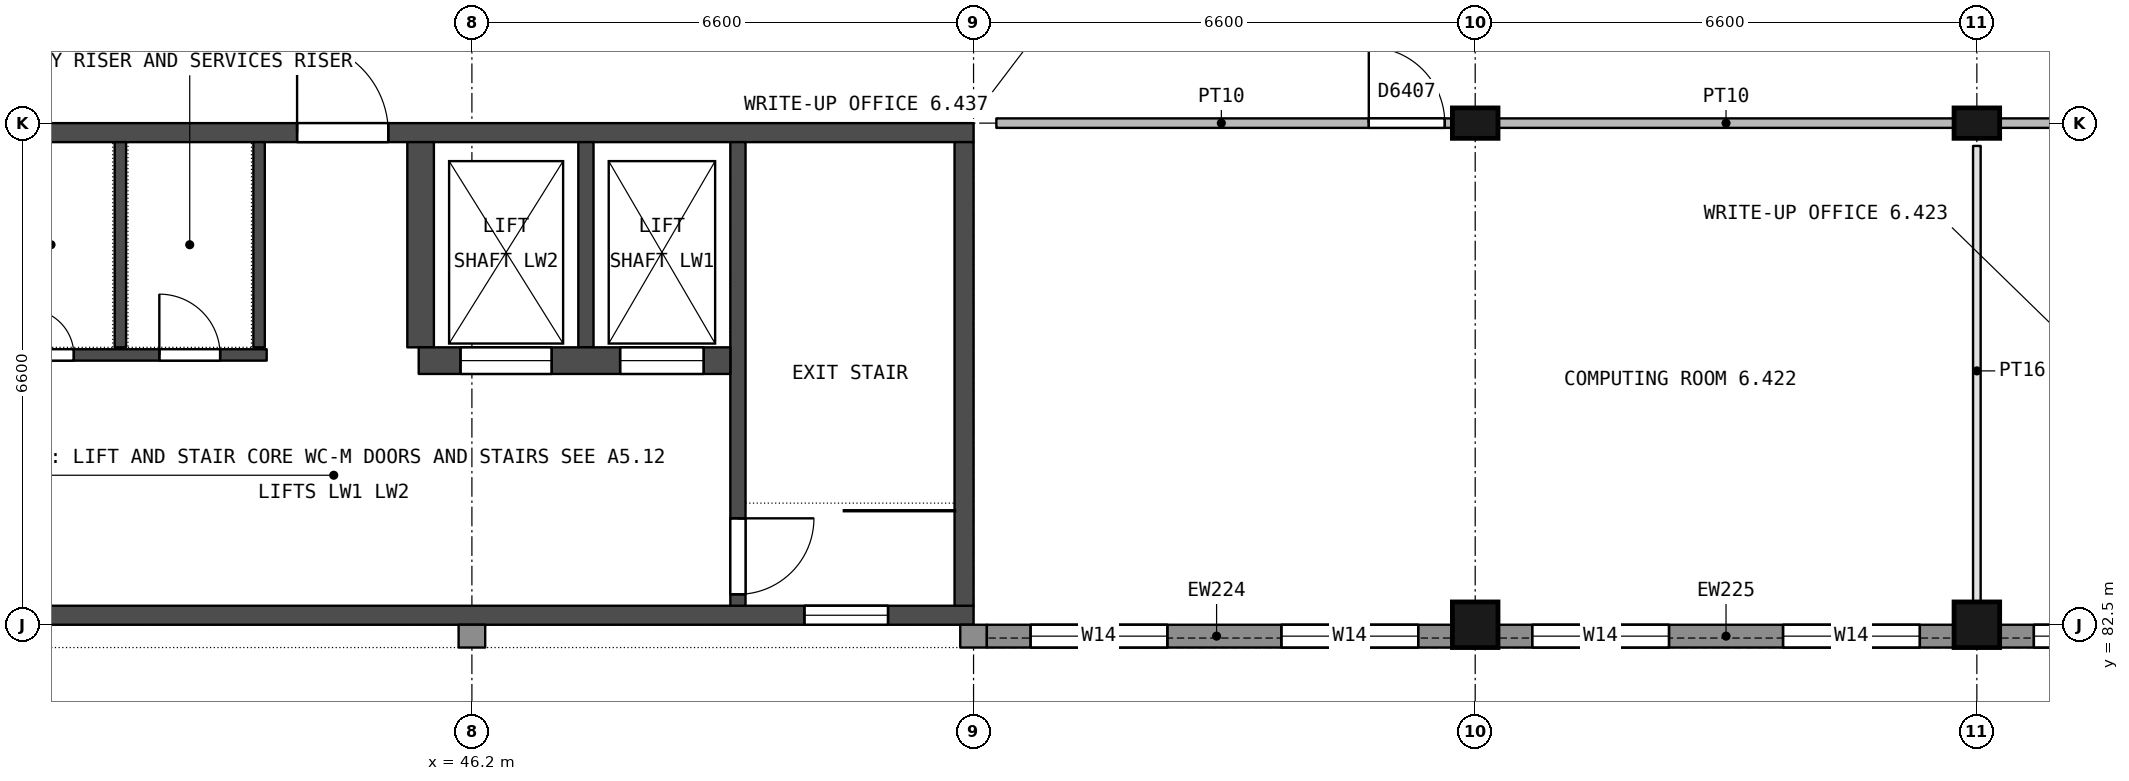
"""IFC4 building model, lengths in metres.
Left out: names, types, materials, properties, quantities, classifications, styles, units other than length and angle.
Written with IfcOpenShell. Run it as: python <this file> out.ifc"""

import sys

from ifc_helpers import new_model, si_unit, direction, frame, frame_2d, origin, origin_2d, place, context, subcontext, project, spatial, rectangle, extrude, element, fill, save


model = new_model("IFC4")
c1 = context("Model", 3, precision=1e-05, world=origin(), true_north=direction((0.0, 1.0)))
c2 = subcontext(c1, "Body", "Model", "MODEL_VIEW")
j1 = project(units=[si_unit("LENGTHUNIT", "METRE"), si_unit("PLANEANGLEUNIT", "RADIAN")], contexts=[c1])
p1 = place(None, origin())
s1 = spatial("IfcSite", under=j1, at=p1, CompositionType="ELEMENT")
p2 = place(p1, origin())
s2 = spatial("IfcBuilding", under=s1, at=p2, CompositionType="ELEMENT")
p3 = place(p2, frame((0.0, 0.0, 18.9)))
s3 = spatial("IfcBuildingStorey", under=s2, at=p3, CompositionType="ELEMENT", Elevation=18.9)
p4 = place(p3, frame((59.4, 82.5, 0.0), z_axis=(0.0, 0.0, 1.0), x_axis=(1.0, 0.0, 0.0)))
e1 = element("IfcColumn", 1, at=p4, inside=s3, PredefinedType="COLUMN", context=c2, shape_type="SweptSolid", body=[
    extrude(rectangle(XDim=0.6, YDim=0.6, at=origin_2d()), origin(), (0.0, 0.0, 1.0), 4.25),
])
p5 = place(p3, frame((59.4, 89.1, 0.0), z_axis=(0.0, 0.0, 1.0), x_axis=(1.0, 0.0, 0.0)))
e2 = element("IfcColumn", 2, at=p5, inside=s3, PredefinedType="COLUMN", context=c2, shape_type="SweptSolid", body=[
    extrude(rectangle(XDim=0.6, YDim=0.4, at=origin_2d()), origin(), (0.0, 0.0, 1.0), 4.25),
])
p6 = place(p3, frame((66.0, 82.5, 0.0), z_axis=(0.0, 0.0, 1.0), x_axis=(1.0, 0.0, 0.0)))
e3 = element("IfcColumn", 3, at=p6, inside=s3, PredefinedType="COLUMN", context=c2, shape_type="SweptSolid", body=[
    extrude(rectangle(XDim=0.6, YDim=0.6, at=origin_2d()), origin(), (0.0, 0.0, 1.0), 4.25),
])
p7 = place(p3, frame((66.0, 89.1, 0.0), z_axis=(0.0, 0.0, 1.0), x_axis=(1.0, 0.0, 0.0)))
e4 = element("IfcColumn", 4, at=p7, inside=s3, PredefinedType="COLUMN", context=c2, shape_type="SweptSolid", body=[
    extrude(rectangle(XDim=0.6, YDim=0.4, at=origin_2d()), origin(), (0.0, 0.0, 1.0), 4.25),
])
p8 = place(p3, frame((52.8, 88.975, 0.0), z_axis=(0.0, 0.0, 1.0), x_axis=(-1.0, 0.0, 0.0)))
e5 = element("IfcWall", 5, at=p8, inside=s3, PredefinedType="SHEAR", context=c2, shape_type="SweptSolid", body=[
    extrude(rectangle(XDim=13.2, YDim=0.25, at=frame_2d((6.6, 0.0))), origin(), (0.0, 0.0, 1.0), 4.25),
])
p9 = place(p8, frame((7.7, 0.0, 0.0)))
e6 = element("IfcOpeningElement", 6, at=p9, cuts=e5, PredefinedType="OPENING", context=c2, shape_type="SweptSolid", body=[
    extrude(rectangle(XDim=1.2, YDim=2.1, at=frame_2d((0.6, 1.05))), frame((0.0, 0.135, 0.0), z_axis=(0.0, -1.0, 0.0), x_axis=(1.0, 0.0, 0.0)), (0.0, 0.0, 1.0), 0.27),
])
p10 = place(p3, frame((52.8, 82.625, 0.0), z_axis=(0.0, 0.0, 1.0), x_axis=(-1.0, 0.0, 0.0)))
e7 = element("IfcWall", 7, at=p10, inside=s3, PredefinedType="SHEAR", context=c2, shape_type="SweptSolid", body=[
    extrude(rectangle(XDim=13.2, YDim=0.25, at=frame_2d((6.6, 0.0))), origin(), (0.0, 0.0, 1.0), 4.25),
])
p11 = place(p10, frame((1.125, 0.0, 0.7)))
e8 = element("IfcOpeningElement", 8, at=p11, cuts=e7, PredefinedType="OPENING", context=c2, shape_type="SweptSolid", body=[
    extrude(rectangle(XDim=1.1, YDim=1.5, at=frame_2d((0.55, 0.75))), frame((0.0, 0.135, 0.0), z_axis=(0.0, -1.0, 0.0), x_axis=(1.0, 0.0, 0.0)), (0.0, 0.0, 1.0), 0.27),
])
p12 = place(p3, frame((52.675, 88.85, 0.0), z_axis=(0.0, 0.0, 1.0), x_axis=(0.0, -1.0, 0.0)))
e9 = element("IfcWall", 9, at=p12, inside=s3, PredefinedType="SHEAR", context=c2, shape_type="SweptSolid", body=[
    extrude(rectangle(XDim=6.1, YDim=0.25, at=frame_2d((3.05, 0.0))), origin(), (0.0, 0.0, 1.0), 4.25),
])
p13 = place(p3, frame((49.7, 88.85, 0.0), z_axis=(0.0, 0.0, 1.0), x_axis=(0.0, -1.0, 0.0)))
e10 = element("IfcWall", 10, at=p13, inside=s3, PredefinedType="SHEAR", context=c2, shape_type="SweptSolid", body=[
    extrude(rectangle(XDim=6.1, YDim=0.2, at=frame_2d((3.05, 0.0))), origin(), (0.0, 0.0, 1.0), 4.25),
])
p14 = place(p13, frame((4.95, 0.0, 0.0)))
e11 = element("IfcOpeningElement", 11, at=p14, cuts=e10, PredefinedType="OPENING", context=c2, shape_type="SweptSolid", body=[
    extrude(rectangle(XDim=1.0, YDim=2.2, at=frame_2d((0.5, 1.1))), frame((0.0, 0.11, 0.0), z_axis=(0.0, -1.0, 0.0), x_axis=(1.0, 0.0, 0.0)), (0.0, 0.0, 1.0), 0.22),
])
p15 = place(p3, frame((47.7, 88.85, 0.0), z_axis=(0.0, 0.0, 1.0), x_axis=(0.0, -1.0, 0.0)))
e12 = element("IfcWall", 12, at=p15, inside=s3, PredefinedType="SHEAR", context=c2, shape_type="SweptSolid", body=[
    extrude(rectangle(XDim=2.7, YDim=0.2, at=frame_2d((1.35, 0.0))), origin(), (0.0, 0.0, 1.0), 4.25),
])
p16 = place(p3, frame((45.525, 88.85, 0.0), z_axis=(0.0, 0.0, 1.0), x_axis=(0.0, -1.0, 0.0)))
e13 = element("IfcWall", 13, at=p16, inside=s3, PredefinedType="SHEAR", context=c2, shape_type="SweptSolid", body=[
    extrude(rectangle(XDim=2.7, YDim=0.35, at=frame_2d((1.35, 0.0))), origin(), (0.0, 0.0, 1.0), 4.25),
])
p17 = place(p3, frame((49.6, 85.975, 0.0), z_axis=(0.0, 0.0, 1.0), x_axis=(-1.0, 0.0, 0.0)))
e14 = element("IfcWall", 14, at=p17, inside=s3, PredefinedType="SHEAR", context=c2, shape_type="SweptSolid", body=[
    extrude(rectangle(XDim=4.1, YDim=0.35, at=frame_2d((2.05, 0.0))), origin(), (0.0, 0.0, 1.0), 4.25),
])
p18 = place(p17, frame((0.35, 0.0, 0.0)))
e15 = element("IfcOpeningElement", 15, at=p18, cuts=e14, PredefinedType="OPENING", context=c2, shape_type="SweptSolid", body=[
    extrude(rectangle(XDim=1.1, YDim=2.2, at=frame_2d((0.55, 1.1))), frame((0.0, 0.185, 0.0), z_axis=(0.0, -1.0, 0.0), x_axis=(1.0, 0.0, 0.0)), (0.0, 0.0, 1.0), 0.37),
])
p19 = place(p17, frame((2.35, 0.0, 0.0)))
e16 = element("IfcOpeningElement", 16, at=p19, cuts=e14, PredefinedType="OPENING", context=c2, shape_type="SweptSolid", body=[
    extrude(rectangle(XDim=1.2, YDim=2.3, at=frame_2d((0.6, 1.15))), frame((0.0, 0.185, 0.0), z_axis=(0.0, -1.0, 0.0), x_axis=(1.0, 0.0, 0.0)), (0.0, 0.0, 1.0), 0.37),
])
p20 = place(p3, frame((43.4, 88.85, 0.0), z_axis=(0.0, 0.0, 1.0), x_axis=(0.0, -1.0, 0.0)))
e17 = element("IfcWall", 17, at=p20, inside=s3, PredefinedType="SHEAR", context=c2, shape_type="SweptSolid", body=[
    extrude(rectangle(XDim=2.7, YDim=0.15, at=frame_2d((1.35, 0.0))), origin(), (0.0, 0.0, 1.0), 4.25),
])
p21 = place(p3, frame((43.5, 86.05, 0.0), z_axis=(0.0, 0.0, 1.0), x_axis=(-1.0, 0.0, 0.0)))
e18 = element("IfcWall", 18, at=p21, inside=s3, PredefinedType="SHEAR", context=c2, shape_type="SweptSolid", body=[
    extrude(rectangle(XDim=3.65, YDim=0.15, at=frame_2d((1.825, 0.0))), origin(), (0.0, 0.0, 1.0), 4.25),
])
p22 = place(p21, frame((0.613, 0.0, 0.0)))
e19 = element("IfcOpeningElement", 19, at=p22, cuts=e18, PredefinedType="OPENING", context=c2, shape_type="SweptSolid", body=[
    extrude(rectangle(XDim=0.8, YDim=2.0, at=frame_2d((0.4, 1.0))), frame((0.0, 0.085, 0.0), z_axis=(0.0, -1.0, 0.0), x_axis=(1.0, 0.0, 0.0)), (0.0, 0.0, 1.0), 0.17),
])
p23 = place(p21, frame((2.538, 0.0, 0.0)))
e20 = element("IfcOpeningElement", 20, at=p23, cuts=e18, PredefinedType="OPENING", context=c2, shape_type="SweptSolid", body=[
    extrude(rectangle(XDim=0.6, YDim=2.1, at=frame_2d((0.3, 1.05))), frame((0.0, 0.085, 0.0), z_axis=(0.0, -1.0, 0.0), x_axis=(1.0, 0.0, 0.0)), (0.0, 0.0, 1.0), 0.17),
])
p24 = place(p3, frame((41.575, 88.85, 0.0), z_axis=(0.0, 0.0, 1.0), x_axis=(0.0, -1.0, 0.0)))
e21 = element("IfcWall", 21, at=p24, inside=s3, PredefinedType="SHEAR", context=c2, shape_type="SweptSolid", body=[
    extrude(rectangle(XDim=2.7, YDim=0.15, at=frame_2d((1.35, 0.0))), origin(), (0.0, 0.0, 1.0), 4.25),
])
for number, where, z_axis, x_axis in (
    (22, (46.375, 82.35, 0.0), (0.0, 0.0, 1.0), (-1.0, 0.0, 0.0)),
    (23, (52.975, 82.35, 0.0), (0.0, 0.0, 1.0), (-1.0, 0.0, 0.0)),
):
    element("IfcWall", number, at=place(p3, frame(where, z_axis=z_axis, x_axis=x_axis)), inside=s3, PredefinedType="STANDARD", context=c2, shape_type="SweptSolid", body=[
        extrude(rectangle(XDim=0.35, YDim=0.3, at=frame_2d((0.175, 0.0))), origin(), (0.0, 0.0, 1.0), 3.65),
    ])
p25 = place(p3, frame((59.1, 82.35, 0.0), z_axis=(0.0, 0.0, 1.0), x_axis=(-1.0, 0.0, 0.0)))
e24 = element("IfcWall", 24, at=p25, inside=s3, PredefinedType="STANDARD", context=c2, shape_type="SweptSolid", body=[
    extrude(rectangle(XDim=6.125, YDim=0.3, at=frame_2d((3.062, 0.0))), origin(), (0.0, 0.0, 1.0), 3.65),
])
p26 = place(p25, frame((3.75, 0.0, 0.9)))
e25 = element("IfcOpeningElement", 25, at=p26, cuts=e24, PredefinedType="OPENING", context=c2, shape_type="SweptSolid", body=[
    extrude(rectangle(XDim=1.8, YDim=1.5, at=frame_2d((0.9, 0.75))), frame((0.0, 0.16, 0.0), z_axis=(0.0, -1.0, 0.0), x_axis=(1.0, 0.0, 0.0)), (0.0, 0.0, 1.0), 0.32),
])
p27 = place(p25, frame((0.45, 0.0, 0.9)))
e26 = element("IfcOpeningElement", 26, at=p27, cuts=e24, PredefinedType="OPENING", context=c2, shape_type="SweptSolid", body=[
    extrude(rectangle(XDim=1.8, YDim=1.5, at=frame_2d((0.9, 0.75))), frame((0.0, 0.16, 0.0), z_axis=(0.0, -1.0, 0.0), x_axis=(1.0, 0.0, 0.0)), (0.0, 0.0, 1.0), 0.32),
])
p28 = place(p3, frame((65.7, 82.35, 0.0), z_axis=(0.0, 0.0, 1.0), x_axis=(-1.0, 0.0, 0.0)))
e27 = element("IfcWall", 27, at=p28, inside=s3, PredefinedType="STANDARD", context=c2, shape_type="SweptSolid", body=[
    extrude(rectangle(XDim=6.0, YDim=0.3, at=frame_2d((3.0, 0.0))), origin(), (0.0, 0.0, 1.0), 3.65),
])
p29 = place(p28, frame((3.75, 0.0, 0.9)))
e28 = element("IfcOpeningElement", 28, at=p29, cuts=e27, PredefinedType="OPENING", context=c2, shape_type="SweptSolid", body=[
    extrude(rectangle(XDim=1.8, YDim=1.5, at=frame_2d((0.9, 0.75))), frame((0.0, 0.16, 0.0), z_axis=(0.0, -1.0, 0.0), x_axis=(1.0, 0.0, 0.0)), (0.0, 0.0, 1.0), 0.32),
])
p30 = place(p28, frame((0.45, 0.0, 0.9)))
e29 = element("IfcOpeningElement", 29, at=p30, cuts=e27, PredefinedType="OPENING", context=c2, shape_type="SweptSolid", body=[
    extrude(rectangle(XDim=1.8, YDim=1.5, at=frame_2d((0.9, 0.75))), frame((0.0, 0.16, 0.0), z_axis=(0.0, -1.0, 0.0), x_axis=(1.0, 0.0, 0.0)), (0.0, 0.0, 1.0), 0.32),
])
p31 = place(p3, frame((72.3, 82.35, 0.0), z_axis=(0.0, 0.0, 1.0), x_axis=(-1.0, 0.0, 0.0)))
e30 = element("IfcWall", 30, at=p31, inside=s3, PredefinedType="STANDARD", context=c2, shape_type="SweptSolid", body=[
    extrude(rectangle(XDim=6.0, YDim=0.3, at=frame_2d((3.0, 0.0))), origin(), (0.0, 0.0, 1.0), 3.65),
])
p32 = place(p31, frame((3.75, 0.0, 0.9)))
e31 = element("IfcOpeningElement", 31, at=p32, cuts=e30, PredefinedType="OPENING", context=c2, shape_type="SweptSolid", body=[
    extrude(rectangle(XDim=1.8, YDim=1.5, at=frame_2d((0.9, 0.75))), frame((0.0, 0.16, 0.0), z_axis=(0.0, -1.0, 0.0), x_axis=(1.0, 0.0, 0.0)), (0.0, 0.0, 1.0), 0.32),
])
p33 = place(p31, frame((0.45, 0.0, 0.9)))
e32 = element("IfcOpeningElement", 32, at=p33, cuts=e30, PredefinedType="OPENING", context=c2, shape_type="SweptSolid", body=[
    extrude(rectangle(XDim=1.8, YDim=1.5, at=frame_2d((0.9, 0.75))), frame((0.0, 0.16, 0.0), z_axis=(0.0, -1.0, 0.0), x_axis=(1.0, 0.0, 0.0)), (0.0, 0.0, 1.0), 0.32),
])
p34 = place(p3, frame((59.1, 89.1, 0.0), z_axis=(0.0, 0.0, 1.0), x_axis=(-1.0, 0.0, 0.0)))
e33 = element("IfcWall", 33, at=p34, inside=s3, PredefinedType="PARTITIONING", context=c2, shape_type="SweptSolid", body=[
    extrude(rectangle(XDim=6.0, YDim=0.125, at=frame_2d((3.0, 0.0))), origin(), (0.0, 0.0, 1.0), 3.65),
])
p35 = place(p34, frame((0.1, 0.0, 0.0)))
e34 = element("IfcOpeningElement", 34, at=p35, cuts=e33, PredefinedType="OPENING", context=c2, shape_type="SweptSolid", body=[
    extrude(rectangle(XDim=1.0, YDim=2.1, at=frame_2d((0.5, 1.05))), frame((0.0, 0.073, 0.0), z_axis=(0.0, -1.0, 0.0), x_axis=(1.0, 0.0, 0.0)), (0.0, 0.0, 1.0), 0.145),
])
p36 = place(p3, frame((59.7, 89.1, 0.0), z_axis=(0.0, 0.0, 1.0), x_axis=(1.0, 0.0, 0.0)))
e35 = element("IfcWall", 35, at=p36, inside=s3, PredefinedType="PARTITIONING", context=c2, shape_type="SweptSolid", body=[
    extrude(rectangle(XDim=6.0, YDim=0.125, at=frame_2d((3.0, 0.0))), origin(), (0.0, 0.0, 1.0), 3.65),
])
p37 = place(p3, frame((72.3, 89.1, 0.0), z_axis=(0.0, 0.0, 1.0), x_axis=(-1.0, 0.0, 0.0)))
e36 = element("IfcWall", 36, at=p37, inside=s3, PredefinedType="PARTITIONING", context=c2, shape_type="SweptSolid", body=[
    extrude(rectangle(XDim=6.0, YDim=0.125, at=frame_2d((3.0, 0.0))), origin(), (0.0, 0.0, 1.0), 3.65),
])
p38 = place(p37, frame((4.2, 0.0, 0.0)))
e37 = element("IfcOpeningElement", 37, at=p38, cuts=e36, PredefinedType="OPENING", context=c2, shape_type="SweptSolid", body=[
    extrude(rectangle(XDim=0.9, YDim=2.1, at=frame_2d((0.45, 1.05))), frame((0.0, 0.073, 0.0), z_axis=(0.0, -1.0, 0.0), x_axis=(1.0, 0.0, 0.0)), (0.0, 0.0, 1.0), 0.145),
])
p39 = place(p37, frame((0.9, 0.0, 0.0)))
e38 = element("IfcOpeningElement", 38, at=p39, cuts=e36, PredefinedType="OPENING", context=c2, shape_type="SweptSolid", body=[
    extrude(rectangle(XDim=0.9, YDim=2.1, at=frame_2d((0.45, 1.05))), frame((0.0, 0.073, 0.0), z_axis=(0.0, -1.0, 0.0), x_axis=(1.0, 0.0, 0.0)), (0.0, 0.0, 1.0), 0.145),
])
p40 = place(p3, frame((66.0, 82.8, 0.0), z_axis=(0.0, 0.0, 1.0), x_axis=(0.0, 1.0, 0.0)))
e39 = element("IfcWall", 39, at=p40, inside=s3, PredefinedType="PARTITIONING", context=c2, shape_type="SweptSolid", body=[
    extrude(rectangle(XDim=6.0, YDim=0.1, at=frame_2d((3.0, 0.0))), origin(), (0.0, 0.0, 1.0), 3.65),
])
p41 = place(p9, origin())
e40 = element("IfcDoor", 40, at=p41, inside=s3, OperationType="SINGLE_SWING_RIGHT", PredefinedType="DOOR", context=c2, shape_type="SweptSolid", body=[
    extrude(rectangle(XDim=1.2, YDim=2.1, at=frame_2d((0.6, 1.05))), frame((0.0, 0.025, 0.0), z_axis=(0.0, -1.0, 0.0), x_axis=(1.0, 0.0, 0.0)), (0.0, 0.0, 1.0), 0.05),
])
fill(e6, e40)
p42 = place(p22, origin())
e41 = element("IfcDoor", 41, at=p42, inside=s3, OperationType="SINGLE_SWING_RIGHT", PredefinedType="DOOR", context=c2, shape_type="SweptSolid", body=[
    extrude(rectangle(XDim=0.8, YDim=2.0, at=frame_2d((0.4, 1.0))), frame((0.0, 0.025, 0.0), z_axis=(0.0, -1.0, 0.0), x_axis=(1.0, 0.0, 0.0)), (0.0, 0.0, 1.0), 0.05),
])
fill(e19, e41)
p43 = place(p23, origin())
e42 = element("IfcDoor", 42, at=p43, inside=s3, OperationType="SINGLE_SWING_RIGHT", PredefinedType="DOOR", context=c2, shape_type="SweptSolid", body=[
    extrude(rectangle(XDim=0.6, YDim=2.1, at=frame_2d((0.3, 1.05))), frame((0.0, 0.025, 0.0), z_axis=(0.0, -1.0, 0.0), x_axis=(1.0, 0.0, 0.0)), (0.0, 0.0, 1.0), 0.05),
])
fill(e20, e42)
p44 = place(p14, origin())
e43 = element("IfcDoor", 43, at=p44, inside=s3, OperationType="SINGLE_SWING_LEFT", PredefinedType="DOOR", context=c2, shape_type="SweptSolid", body=[
    extrude(rectangle(XDim=1.0, YDim=2.2, at=frame_2d((0.5, 1.1))), frame((0.0, 0.025, 0.0), z_axis=(0.0, -1.0, 0.0), x_axis=(1.0, 0.0, 0.0)), (0.0, 0.0, 1.0), 0.05),
])
fill(e11, e43)
p45 = place(p18, origin())
e44 = element("IfcDoor", 44, at=p45, inside=s3, OperationType="DOUBLE_DOOR_SLIDING", PredefinedType="NOTDEFINED", context=c2, shape_type="SweptSolid", body=[
    extrude(rectangle(XDim=1.1, YDim=2.2, at=frame_2d((0.55, 1.1))), frame((0.0, 0.025, 0.0), z_axis=(0.0, -1.0, 0.0), x_axis=(1.0, 0.0, 0.0)), (0.0, 0.0, 1.0), 0.05),
])
fill(e15, e44)
p46 = place(p19, origin())
e45 = element("IfcDoor", 45, at=p46, inside=s3, OperationType="DOUBLE_DOOR_SLIDING", PredefinedType="NOTDEFINED", context=c2, shape_type="SweptSolid", body=[
    extrude(rectangle(XDim=1.2, YDim=2.3, at=frame_2d((0.6, 1.15))), frame((0.0, 0.025, 0.0), z_axis=(0.0, -1.0, 0.0), x_axis=(1.0, 0.0, 0.0)), (0.0, 0.0, 1.0), 0.05),
])
fill(e16, e45)
p47 = place(p11, origin())
e46 = element("IfcWindow", 46, at=p47, inside=s3, PartitioningType="SINGLE_PANEL", PredefinedType="WINDOW", context=c2, shape_type="SweptSolid", body=[
    extrude(rectangle(XDim=1.1, YDim=1.5, at=frame_2d((0.55, 0.75))), frame((0.0, 0.03, 0.0), z_axis=(0.0, -1.0, 0.0), x_axis=(1.0, 0.0, 0.0)), (0.0, 0.0, 1.0), 0.06),
])
fill(e8, e46)
p48 = place(p26, origin())
e47 = element("IfcWindow", 47, at=p48, inside=s3, PartitioningType="SINGLE_PANEL", PredefinedType="WINDOW", context=c2, shape_type="SweptSolid", body=[
    extrude(rectangle(XDim=1.8, YDim=1.5, at=frame_2d((0.9, 0.75))), frame((0.0, 0.03, 0.0), z_axis=(0.0, -1.0, 0.0), x_axis=(1.0, 0.0, 0.0)), (0.0, 0.0, 1.0), 0.06),
])
fill(e25, e47)
p49 = place(p27, origin())
e48 = element("IfcWindow", 48, at=p49, inside=s3, PartitioningType="SINGLE_PANEL", PredefinedType="WINDOW", context=c2, shape_type="SweptSolid", body=[
    extrude(rectangle(XDim=1.8, YDim=1.5, at=frame_2d((0.9, 0.75))), frame((0.0, 0.03, 0.0), z_axis=(0.0, -1.0, 0.0), x_axis=(1.0, 0.0, 0.0)), (0.0, 0.0, 1.0), 0.06),
])
fill(e26, e48)
p50 = place(p29, origin())
e49 = element("IfcWindow", 49, at=p50, inside=s3, PartitioningType="SINGLE_PANEL", PredefinedType="WINDOW", context=c2, shape_type="SweptSolid", body=[
    extrude(rectangle(XDim=1.8, YDim=1.5, at=frame_2d((0.9, 0.75))), frame((0.0, 0.03, 0.0), z_axis=(0.0, -1.0, 0.0), x_axis=(1.0, 0.0, 0.0)), (0.0, 0.0, 1.0), 0.06),
])
fill(e28, e49)
p51 = place(p30, origin())
e50 = element("IfcWindow", 50, at=p51, inside=s3, PartitioningType="SINGLE_PANEL", PredefinedType="WINDOW", context=c2, shape_type="SweptSolid", body=[
    extrude(rectangle(XDim=1.8, YDim=1.5, at=frame_2d((0.9, 0.75))), frame((0.0, 0.03, 0.0), z_axis=(0.0, -1.0, 0.0), x_axis=(1.0, 0.0, 0.0)), (0.0, 0.0, 1.0), 0.06),
])
fill(e29, e50)
p52 = place(p32, origin())
e51 = element("IfcWindow", 51, at=p52, inside=s3, PartitioningType="SINGLE_PANEL", PredefinedType="WINDOW", context=c2, shape_type="SweptSolid", body=[
    extrude(rectangle(XDim=1.8, YDim=1.5, at=frame_2d((0.9, 0.75))), frame((0.0, 0.03, 0.0), z_axis=(0.0, -1.0, 0.0), x_axis=(1.0, 0.0, 0.0)), (0.0, 0.0, 1.0), 0.06),
])
fill(e31, e51)
p53 = place(p35, origin())
e52 = element("IfcDoor", 52, at=p53, inside=s3, OperationType="SINGLE_SWING_RIGHT", PredefinedType="DOOR", context=c2, shape_type="SweptSolid", body=[
    extrude(rectangle(XDim=1.0, YDim=2.1, at=frame_2d((0.5, 1.05))), frame((0.0, 0.025, 0.0), z_axis=(0.0, -1.0, 0.0), x_axis=(1.0, 0.0, 0.0)), (0.0, 0.0, 1.0), 0.05),
])
fill(e34, e52)
save(model, sys.argv[1])
